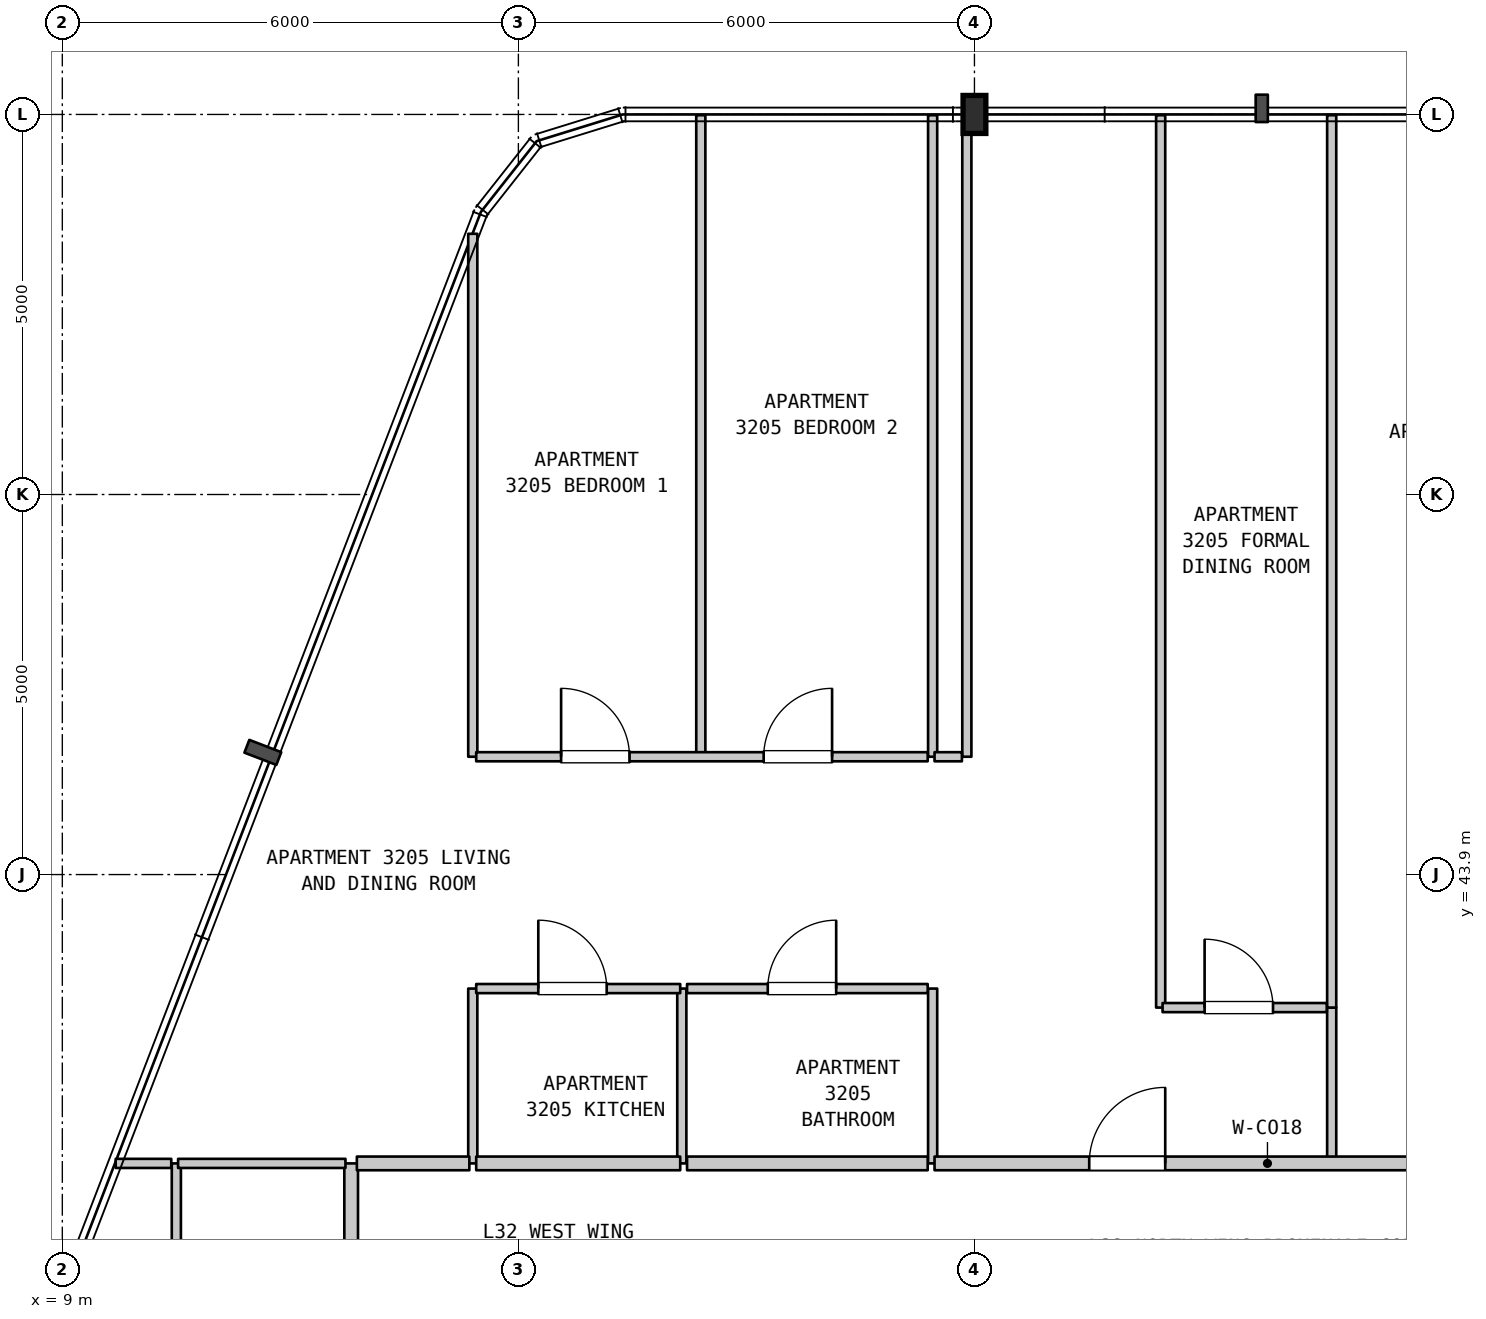
"""IFC4 building model, lengths in metres.
Left out: names, types, materials, properties, quantities, classifications, styles, units other than length and angle.
Written with IfcOpenShell. Run it as: python <this file> out.ifc"""

import sys

from ifc_helpers import new_model, si_unit, direction, frame, frame_2d, origin, origin_2d, place, context, subcontext, project, spatial, rectangle, i_section, extrude, element, fill, save


model = new_model("IFC4")
c1 = context("Model", 3, precision=1e-05, world=origin(), true_north=direction((0.0, 1.0)))
c2 = subcontext(c1, "Body", "Model", "MODEL_VIEW")
j1 = project(units=[si_unit("LENGTHUNIT", "METRE"), si_unit("PLANEANGLEUNIT", "RADIAN")], contexts=[c1])
p1 = place(None, origin())
s1 = spatial("IfcSite", under=j1, at=p1, CompositionType="ELEMENT")
p2 = place(p1, origin())
s2 = spatial("IfcBuilding", under=s1, at=p2, CompositionType="ELEMENT")
p3 = place(p2, frame((0.0, 0.0, 133.5)))
s3 = spatial("IfcBuildingStorey", under=s2, at=p3, CompositionType="ELEMENT", Elevation=133.5)
p4 = place(p3, frame((21.0, 53.9, 0.0), z_axis=(0.0, 0.0, 1.0), x_axis=(1.0, 0.0, 0.0)))
e1 = element("IfcColumn", 1, at=p4, inside=s3, PredefinedType="COLUMN", context=c2, shape_type="SweptSolid", body=[
    extrude(i_section(OverallWidth=0.3, OverallDepth=0.5, WebThickness=0.014, FlangeThickness=0.028, FilletRadius=0.027, at=origin_2d()), origin(), (0.0, 0.0, 1.0), 3.7),
])
p5 = place(p3, frame((10.5, 32.36, 0.0), z_axis=(0.0, 0.0, 1.0), x_axis=(0.0, 1.0, 0.0)))
e2 = element("IfcWall", 2, at=p5, inside=s3, PredefinedType="PARTITIONING", context=c2, shape_type="SweptSolid", body=[
    extrude(rectangle(XDim=7.74, YDim=0.12, at=frame_2d((3.87, 0.0))), origin(), (0.0, 0.0, 1.0), 3.385),
])
p6 = place(p3, frame((12.8, 32.36, 0.0), z_axis=(0.0, 0.0, 1.0), x_axis=(0.0, 1.0, 0.0)))
e3 = element("IfcWall", 3, at=p6, inside=s3, PredefinedType="STANDARD", context=c2, shape_type="SweptSolid", body=[
    extrude(rectangle(XDim=7.74, YDim=0.18, at=frame_2d((3.87, 0.0))), origin(), (0.0, 0.0, 1.0), 3.385),
])
p7 = place(p3, frame((14.4, 40.1, 0.0), z_axis=(0.0, 0.0, 1.0), x_axis=(0.0, 1.0, 0.0)))
e4 = element("IfcWall", 4, at=p7, inside=s3, PredefinedType="PARTITIONING", context=c2, shape_type="SweptSolid", body=[
    extrude(rectangle(XDim=2.3, YDim=0.12, at=frame_2d((1.15, 0.0))), origin(), (0.0, 0.0, 1.0), 3.385),
])
p8 = place(p3, frame((14.4, 45.45, 0.0), z_axis=(0.0, 0.0, 1.0), x_axis=(0.0, 1.0, 0.0)))
e5 = element("IfcWall", 5, at=p8, inside=s3, PredefinedType="PARTITIONING", context=c2, shape_type="SweptSolid", body=[
    extrude(rectangle(XDim=6.88, YDim=0.12, at=frame_2d((3.44, 0.0))), origin(), (0.0, 0.0, 1.0), 3.385),
])
p9 = place(p3, frame((17.15, 40.1, 0.0), z_axis=(0.0, 0.0, 1.0), x_axis=(0.0, 1.0, 0.0)))
e6 = element("IfcWall", 6, at=p9, inside=s3, PredefinedType="PARTITIONING", context=c2, shape_type="SweptSolid", body=[
    extrude(rectangle(XDim=2.3, YDim=0.12, at=frame_2d((1.15, 0.0))), origin(), (0.0, 0.0, 1.0), 3.385),
])
p10 = place(p3, frame((17.4, 45.45, 0.0), z_axis=(0.0, 0.0, 1.0), x_axis=(0.0, 1.0, 0.0)))
e7 = element("IfcWall", 7, at=p10, inside=s3, PredefinedType="PARTITIONING", context=c2, shape_type="SweptSolid", body=[
    extrude(rectangle(XDim=8.44, YDim=0.12, at=frame_2d((4.22, 0.0))), origin(), (0.0, 0.0, 1.0), 3.385),
])
p11 = place(p3, frame((20.45, 40.1, 0.0), z_axis=(0.0, 0.0, 1.0), x_axis=(0.0, 1.0, 0.0)))
e8 = element("IfcWall", 8, at=p11, inside=s3, PredefinedType="PARTITIONING", context=c2, shape_type="SweptSolid", body=[
    extrude(rectangle(XDim=2.3, YDim=0.12, at=frame_2d((1.15, 0.0))), origin(), (0.0, 0.0, 1.0), 3.385),
])
for number, where, z_axis, x_axis in (
    (9, (20.45, 45.45, 0.0), (0.0, 0.0, 1.0), (0.0, 1.0, 0.0)),
    (10, (20.9, 45.45, 0.0), (0.0, 0.0, 1.0), (0.0, 1.0, 0.0)),
):
    element("IfcWall", number, at=place(p3, frame(where, z_axis=z_axis, x_axis=x_axis)), inside=s3, PredefinedType="PARTITIONING", context=c2, shape_type="SweptSolid", body=[
        extrude(rectangle(XDim=8.44, YDim=0.12, at=frame_2d((4.22, 0.0))), origin(), (0.0, 0.0, 1.0), 3.385),
    ])
p12 = place(p3, frame((23.45, 42.15, 0.0), z_axis=(0.0, 0.0, 1.0), x_axis=(0.0, 1.0, 0.0)))
e11 = element("IfcWall", 11, at=p12, inside=s3, PredefinedType="PARTITIONING", context=c2, shape_type="SweptSolid", body=[
    extrude(rectangle(XDim=11.74, YDim=0.12, at=frame_2d((5.87, 0.0))), origin(), (0.0, 0.0, 1.0), 3.385),
])
p13 = place(p3, frame((25.7, 40.1, 0.0), z_axis=(0.0, 0.0, 1.0), x_axis=(0.0, 1.0, 0.0)))
e12 = element("IfcWall", 12, at=p13, inside=s3, PredefinedType="PARTITIONING", context=c2, shape_type="SweptSolid", body=[
    extrude(rectangle(XDim=2.05, YDim=0.12, at=frame_2d((1.025, 0.0))), origin(), (0.0, 0.0, 1.0), 3.385),
])
p14 = place(p3, frame((25.7, 42.15, 0.0), z_axis=(0.0, 0.0, 1.0), x_axis=(0.0, 1.0, 0.0)))
e13 = element("IfcWall", 13, at=p14, inside=s3, PredefinedType="PARTITIONING", context=c2, shape_type="SweptSolid", body=[
    extrude(rectangle(XDim=11.74, YDim=0.12, at=frame_2d((5.87, 0.0))), origin(), (0.0, 0.0, 1.0), 3.385),
])
p15 = place(p3, frame((9.702, 40.1, 0.0), z_axis=(0.0, 0.0, 1.0), x_axis=(1.0, 0.0, 0.0)))
e14 = element("IfcWall", 14, at=p15, inside=s3, PredefinedType="PARTITIONING", context=c2, shape_type="SweptSolid", body=[
    extrude(rectangle(XDim=0.731, YDim=0.12, at=frame_2d((0.366, 0.0))), origin(), (0.0, 0.0, 1.0), 3.385),
])
p16 = place(p3, frame((10.523, 40.1, 0.0), z_axis=(0.0, 0.0, 1.0), x_axis=(1.0, 0.0, 0.0)))
e15 = element("IfcWall", 15, at=p16, inside=s3, PredefinedType="PARTITIONING", context=c2, shape_type="SweptSolid", body=[
    extrude(rectangle(XDim=2.202, YDim=0.12, at=frame_2d((1.101, 0.0))), origin(), (0.0, 0.0, 1.0), 3.385),
])
p17 = place(p3, frame((12.875, 40.1, 0.0), z_axis=(0.0, 0.0, 1.0), x_axis=(1.0, 0.0, 0.0)))
e16 = element("IfcWall", 16, at=p17, inside=s3, PredefinedType="STANDARD", context=c2, shape_type="SweptSolid", body=[
    extrude(rectangle(XDim=1.48, YDim=0.18, at=frame_2d((0.74, 0.0))), origin(), (0.0, 0.0, 1.0), 3.385),
])
p18 = place(p3, frame((14.445, 40.1, 0.0), z_axis=(0.0, 0.0, 1.0), x_axis=(1.0, 0.0, 0.0)))
e17 = element("IfcWall", 17, at=p18, inside=s3, PredefinedType="STANDARD", context=c2, shape_type="SweptSolid", body=[
    extrude(rectangle(XDim=2.684, YDim=0.18, at=frame_2d((1.342, 0.0))), origin(), (0.0, 0.0, 1.0), 3.385),
])
p19 = place(p3, frame((17.219, 40.1, 0.0), z_axis=(0.0, 0.0, 1.0), x_axis=(1.0, 0.0, 0.0)))
e18 = element("IfcWall", 18, at=p19, inside=s3, PredefinedType="STANDARD", context=c2, shape_type="SweptSolid", body=[
    extrude(rectangle(XDim=3.166, YDim=0.18, at=frame_2d((1.583, 0.0))), origin(), (0.0, 0.0, 1.0), 3.385),
])
p20 = place(p3, frame((20.475, 40.1, 0.0), z_axis=(0.0, 0.0, 1.0), x_axis=(1.0, 0.0, 0.0)))
e19 = element("IfcWall", 19, at=p20, inside=s3, PredefinedType="STANDARD", context=c2, shape_type="SweptSolid", body=[
    extrude(rectangle(XDim=8.76, YDim=0.18, at=frame_2d((4.38, 0.0))), origin(), (0.0, 0.0, 1.0), 3.385),
])
p21 = place(p20, frame((2.035, 0.0, 0.0)))
e20 = element("IfcOpeningElement", 20, at=p21, cuts=e19, PredefinedType="OPENING", context=c2, shape_type="SweptSolid", body=[
    extrude(rectangle(XDim=1.0, YDim=2.15, at=frame_2d((0.5, 1.075))), frame((0.0, 0.1, 0.0), z_axis=(0.0, -1.0, 0.0), x_axis=(1.0, 0.0, 0.0)), (0.0, 0.0, 1.0), 0.2),
])
p22 = place(p20, frame((6.409, 0.0, 0.0)))
e21 = element("IfcOpeningElement", 21, at=p22, cuts=e19, PredefinedType="OPENING", context=c2, shape_type="SweptSolid", body=[
    extrude(rectangle(XDim=1.0, YDim=2.15, at=frame_2d((0.5, 1.075))), frame((0.0, 0.1, 0.0), z_axis=(0.0, -1.0, 0.0), x_axis=(1.0, 0.0, 0.0)), (0.0, 0.0, 1.0), 0.2),
])
p23 = place(p3, frame((23.475, 42.15, 0.0), z_axis=(0.0, 0.0, 1.0), x_axis=(1.0, 0.0, 0.0)))
e22 = element("IfcWall", 22, at=p23, inside=s3, PredefinedType="PARTITIONING", context=c2, shape_type="SweptSolid", body=[
    extrude(rectangle(XDim=2.16, YDim=0.12, at=frame_2d((1.08, 0.0))), origin(), (0.0, 0.0, 1.0), 3.385),
])
p24 = place(p23, frame((0.553, 0.0, 0.0)))
e23 = element("IfcOpeningElement", 23, at=p24, cuts=e22, PredefinedType="OPENING", context=c2, shape_type="SweptSolid", body=[
    extrude(rectangle(XDim=0.9, YDim=2.15, at=frame_2d((0.45, 1.075))), frame((0.0, 0.07, 0.0), z_axis=(0.0, -1.0, 0.0), x_axis=(1.0, 0.0, 0.0)), (0.0, 0.0, 1.0), 0.14),
])
p25 = place(p3, frame((14.445, 42.4, 0.0), z_axis=(0.0, 0.0, 1.0), x_axis=(1.0, 0.0, 0.0)))
e24 = element("IfcWall", 24, at=p25, inside=s3, PredefinedType="PARTITIONING", context=c2, shape_type="SweptSolid", body=[
    extrude(rectangle(XDim=2.684, YDim=0.12, at=frame_2d((1.342, 0.0))), origin(), (0.0, 0.0, 1.0), 3.385),
])
p26 = place(p25, frame((0.817, 0.0, 0.0)))
e25 = element("IfcOpeningElement", 25, at=p26, cuts=e24, PredefinedType="OPENING", context=c2, shape_type="SweptSolid", body=[
    extrude(rectangle(XDim=0.9, YDim=2.15, at=frame_2d((0.45, 1.075))), frame((0.0, 0.07, 0.0), z_axis=(0.0, -1.0, 0.0), x_axis=(1.0, 0.0, 0.0)), (0.0, 0.0, 1.0), 0.14),
])
p27 = place(p3, frame((17.219, 42.4, 0.0), z_axis=(0.0, 0.0, 1.0), x_axis=(1.0, 0.0, 0.0)))
e26 = element("IfcWall", 26, at=p27, inside=s3, PredefinedType="PARTITIONING", context=c2, shape_type="SweptSolid", body=[
    extrude(rectangle(XDim=3.166, YDim=0.12, at=frame_2d((1.583, 0.0))), origin(), (0.0, 0.0, 1.0), 3.385),
])
p28 = place(p27, frame((1.062, 0.0, 0.0)))
e27 = element("IfcOpeningElement", 27, at=p28, cuts=e26, PredefinedType="OPENING", context=c2, shape_type="SweptSolid", body=[
    extrude(rectangle(XDim=0.9, YDim=2.1, at=frame_2d((0.45, 1.05))), frame((0.0, 0.07, 0.0), z_axis=(0.0, -1.0, 0.0), x_axis=(1.0, 0.0, 0.0)), (0.0, 0.0, 1.0), 0.14),
])
p29 = place(p3, frame((14.445, 45.45, 0.0), z_axis=(0.0, 0.0, 1.0), x_axis=(1.0, 0.0, 0.0)))
e28 = element("IfcWall", 28, at=p29, inside=s3, PredefinedType="PARTITIONING", context=c2, shape_type="SweptSolid", body=[
    extrude(rectangle(XDim=5.94, YDim=0.12, at=frame_2d((2.97, 0.0))), origin(), (0.0, 0.0, 1.0), 3.385),
])
p30 = place(p29, frame((1.117, 0.0, 0.0)))
e29 = element("IfcOpeningElement", 29, at=p30, cuts=e28, PredefinedType="OPENING", context=c2, shape_type="SweptSolid", body=[
    extrude(rectangle(XDim=0.9, YDim=2.15, at=frame_2d((0.45, 1.075))), frame((0.0, 0.07, 0.0), z_axis=(0.0, -1.0, 0.0), x_axis=(1.0, 0.0, 0.0)), (0.0, 0.0, 1.0), 0.14),
])
p31 = place(p29, frame((3.782, 0.0, 0.0)))
e30 = element("IfcOpeningElement", 30, at=p31, cuts=e28, PredefinedType="OPENING", context=c2, shape_type="SweptSolid", body=[
    extrude(rectangle(XDim=0.9, YDim=2.15, at=frame_2d((0.45, 1.075))), frame((0.0, 0.07, 0.0), z_axis=(0.0, -1.0, 0.0), x_axis=(1.0, 0.0, 0.0)), (0.0, 0.0, 1.0), 0.14),
])
p32 = place(p3, frame((20.475, 45.45, 0.0), z_axis=(0.0, 0.0, 1.0), x_axis=(1.0, 0.0, 0.0)))
e31 = element("IfcWall", 31, at=p32, inside=s3, PredefinedType="PARTITIONING", context=c2, shape_type="SweptSolid", body=[
    extrude(rectangle(XDim=0.36, YDim=0.12, at=frame_2d((0.18, 0.0))), origin(), (0.0, 0.0, 1.0), 3.385),
])
p33 = place(p21, origin())
e32 = element("IfcDoor", 32, at=p33, inside=s3, OperationType="SINGLE_SWING_RIGHT", PredefinedType="DOOR", context=c2, shape_type="SweptSolid", body=[
    extrude(rectangle(XDim=1.0, YDim=2.15, at=frame_2d((0.5, 1.075))), frame((0.0, 0.025, 0.0), z_axis=(0.0, -1.0, 0.0), x_axis=(1.0, 0.0, 0.0)), (0.0, 0.0, 1.0), 0.05),
])
fill(e20, e32)
p34 = place(p24, origin())
e33 = element("IfcDoor", 33, at=p34, inside=s3, OperationType="SINGLE_SWING_LEFT", PredefinedType="DOOR", context=c2, shape_type="SweptSolid", body=[
    extrude(rectangle(XDim=0.9, YDim=2.15, at=frame_2d((0.45, 1.075))), frame((0.0, 0.025, 0.0), z_axis=(0.0, -1.0, 0.0), x_axis=(1.0, 0.0, 0.0)), (0.0, 0.0, 1.0), 0.05),
])
fill(e23, e33)
p35 = place(p26, origin())
e34 = element("IfcDoor", 34, at=p35, inside=s3, OperationType="SINGLE_SWING_LEFT", PredefinedType="DOOR", context=c2, shape_type="SweptSolid", body=[
    extrude(rectangle(XDim=0.9, YDim=2.15, at=frame_2d((0.45, 1.075))), frame((0.0, 0.025, 0.0), z_axis=(0.0, -1.0, 0.0), x_axis=(1.0, 0.0, 0.0)), (0.0, 0.0, 1.0), 0.05),
])
fill(e25, e34)
p36 = place(p28, origin())
e35 = element("IfcDoor", 35, at=p36, inside=s3, OperationType="SINGLE_SWING_RIGHT", PredefinedType="DOOR", context=c2, shape_type="SweptSolid", body=[
    extrude(rectangle(XDim=0.9, YDim=2.1, at=frame_2d((0.45, 1.05))), frame((0.0, 0.025, 0.0), z_axis=(0.0, -1.0, 0.0), x_axis=(1.0, 0.0, 0.0)), (0.0, 0.0, 1.0), 0.05),
])
fill(e27, e35)
p37 = place(p30, origin())
e36 = element("IfcDoor", 36, at=p37, inside=s3, OperationType="SINGLE_SWING_LEFT", PredefinedType="DOOR", context=c2, shape_type="SweptSolid", body=[
    extrude(rectangle(XDim=0.9, YDim=2.15, at=frame_2d((0.45, 1.075))), frame((0.0, 0.025, 0.0), z_axis=(0.0, -1.0, 0.0), x_axis=(1.0, 0.0, 0.0)), (0.0, 0.0, 1.0), 0.05),
])
fill(e29, e36)
p38 = place(p31, origin())
e37 = element("IfcDoor", 37, at=p38, inside=s3, OperationType="SINGLE_SWING_RIGHT", PredefinedType="DOOR", context=c2, shape_type="SweptSolid", body=[
    extrude(rectangle(XDim=0.9, YDim=2.15, at=frame_2d((0.45, 1.075))), frame((0.0, 0.025, 0.0), z_axis=(0.0, -1.0, 0.0), x_axis=(1.0, 0.0, 0.0)), (0.0, 0.0, 1.0), 0.05),
])
fill(e30, e37)
save(model, sys.argv[1])
